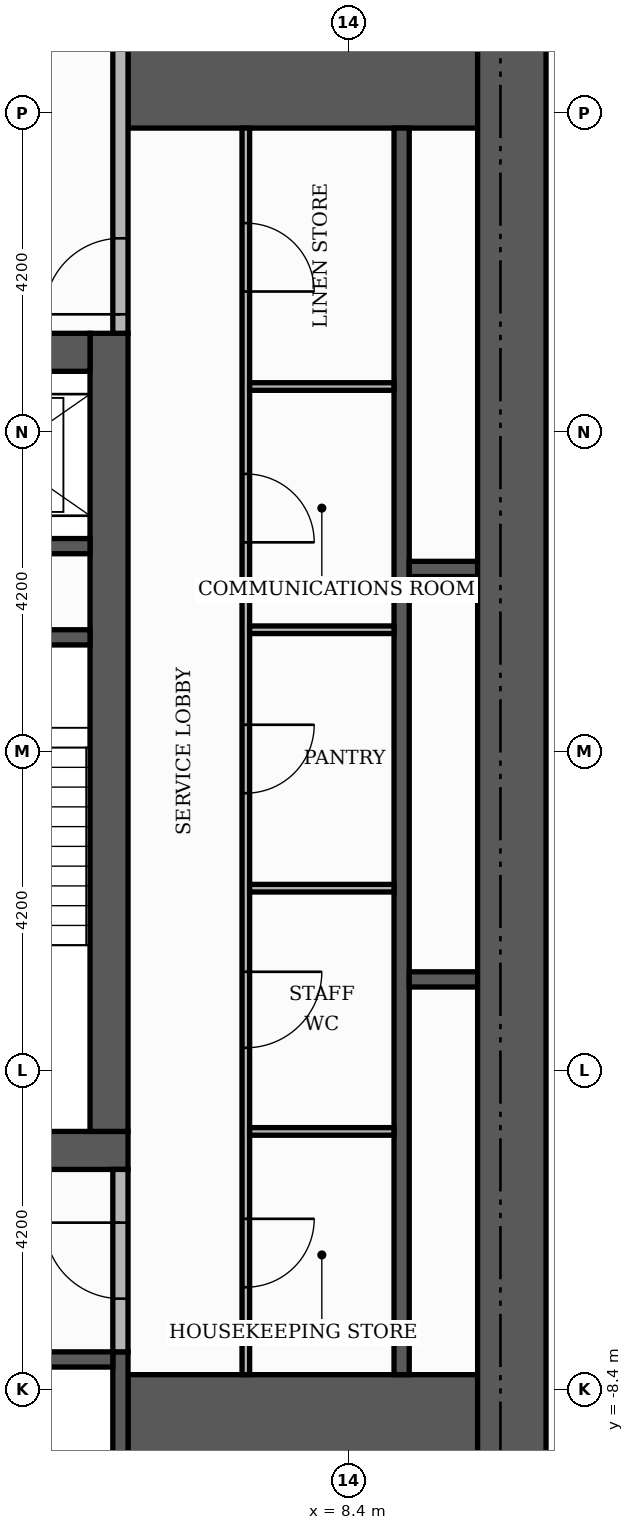
"""IFC4 building model, lengths in metres.
Left out: names, types, materials, properties, quantities, classifications, styles, units other than length and angle.
Written with IfcOpenShell. Run it as: python <this file> out.ifc"""

import sys

from ifc_helpers import new_model, si_unit, direction, frame, frame_2d, origin, place, context, subcontext, project, spatial, rectangle, extrude, element, fill, save


model = new_model("IFC4")
c1 = context("Model", 3, precision=1e-05, world=origin(), true_north=direction((0.0, 1.0)))
c2 = subcontext(c1, "Body", "Model", "MODEL_VIEW")
j1 = project(units=[si_unit("LENGTHUNIT", "METRE"), si_unit("PLANEANGLEUNIT", "RADIAN")], contexts=[c1])
p1 = place(None, origin())
s1 = spatial("IfcSite", under=j1, at=p1, CompositionType="ELEMENT")
p2 = place(p1, origin())
s2 = spatial("IfcBuilding", under=s1, at=p2, CompositionType="ELEMENT")
p3 = place(p2, frame((0.0, 0.0, 118.2)))
s3 = spatial("IfcBuildingStorey", under=s2, at=p3, CompositionType="ELEMENT", Elevation=118.2)
p4 = place(p3, frame((-5.5, -5.25, 0.0), z_axis=(0.0, 0.0, 1.0), x_axis=(1.0, 0.0, 0.0)))
e1 = element("IfcWall", 1, at=p4, inside=s3, PredefinedType="SHEAR", context=c2, shape_type="SweptSolid", body=[
    extrude(rectangle(XDim=11.0, YDim=0.5, at=frame_2d((5.5, 0.0))), origin(), (0.0, 0.0, 1.0), 3.48),
])
p5 = place(p4, frame((4.9, 0.0, 0.0)))
e2 = element("IfcOpeningElement", 2, at=p5, cuts=e1, PredefinedType="OPENING", context=c2, shape_type="SweptSolid", body=[
    extrude(rectangle(XDim=1.2, YDim=2.1, at=frame_2d((0.6, 1.05))), frame((0.0, 0.26, 0.0), z_axis=(0.0, -1.0, 0.0), x_axis=(1.0, 0.0, 0.0)), (0.0, 0.0, 1.0), 0.52),
])
p6 = place(p3, frame((5.25, -5.0, 0.0), z_axis=(0.0, 0.0, 1.0), x_axis=(0.0, 1.0, 0.0)))
e3 = element("IfcWall", 3, at=p6, inside=s3, PredefinedType="SHEAR", context=c2, shape_type="SweptSolid", body=[
    extrude(rectangle(XDim=10.5, YDim=0.5, at=frame_2d((5.25, 0.0))), origin(), (0.0, 0.0, 1.0), 3.48),
])
p7 = place(p3, frame((-5.0, 5.25, 0.0), z_axis=(0.0, 0.0, 1.0), x_axis=(1.0, 0.0, 0.0)))
e4 = element("IfcWall", 4, at=p7, inside=s3, PredefinedType="SHEAR", context=c2, shape_type="SweptSolid", body=[
    extrude(rectangle(XDim=10.0, YDim=0.5, at=frame_2d((5.0, 0.0))), origin(), (0.0, 0.0, 1.0), 3.48),
])
p8 = place(p7, frame((4.4, 0.0, 0.0)))
e5 = element("IfcOpeningElement", 5, at=p8, cuts=e4, PredefinedType="OPENING", context=c2, shape_type="SweptSolid", body=[
    extrude(rectangle(XDim=1.2, YDim=2.1, at=frame_2d((0.6, 1.05))), frame((0.0, 0.26, 0.0), z_axis=(0.0, -1.0, 0.0), x_axis=(1.0, 0.0, 0.0)), (0.0, 0.0, 1.0), 0.52),
])
for number, where, z_axis, x_axis in (
    (6, (5.5, -9.15, 0.0), (0.0, 0.0, 1.0), (1.0, 0.0, 0.0)),
    (7, (5.5, 9.15, 0.0), (0.0, 0.0, 1.0), (1.0, 0.0, 0.0)),
):
    element("IfcWall", number, at=place(p3, frame(where, z_axis=z_axis, x_axis=x_axis)), inside=s3, PredefinedType="SHEAR", context=c2, shape_type="SweptSolid", body=[
        extrude(rectangle(XDim=4.6, YDim=1.9, at=frame_2d((2.3, 0.0))), origin(), (0.0, 0.0, 1.0), 3.48),
    ])
p9 = place(p3, frame((2.15, 1.5, 0.0), z_axis=(0.0, 0.0, 1.0), x_axis=(1.0, 0.0, 0.0)))
e8 = element("IfcWall", 8, at=p9, inside=s3, PredefinedType="SHEAR", context=c2, shape_type="SweptSolid", body=[
    extrude(rectangle(XDim=2.85, YDim=0.2, at=frame_2d((1.425, 0.0))), origin(), (0.0, 0.0, 1.0), 3.48),
])
p10 = place(p3, frame((5.4, -10.1, 0.0), z_axis=(0.0, 0.0, 1.0), x_axis=(0.0, 1.0, 0.0)))
e9 = element("IfcWall", 9, at=p10, inside=s3, PredefinedType="SHEAR", context=c2, shape_type="SweptSolid", body=[
    extrude(rectangle(XDim=2.2, YDim=0.2, at=frame_2d((1.1, 0.0))), origin(), (0.0, 0.0, 1.0), 3.48),
])
p11 = place(p3, frame((9.1, -8.2, 0.0), z_axis=(0.0, 0.0, 1.0), x_axis=(0.0, 1.0, 0.0)))
e10 = element("IfcWall", 10, at=p11, inside=s3, PredefinedType="SHEAR", context=c2, shape_type="SweptSolid", body=[
    extrude(rectangle(XDim=16.4, YDim=0.2, at=frame_2d((8.2, 0.0))), origin(), (0.0, 0.0, 1.0), 3.48),
])
p12 = place(p3, frame((2.8, -8.0, 0.0), z_axis=(0.0, 0.0, 1.0), x_axis=(1.0, 0.0, 0.0)))
e11 = element("IfcWall", 11, at=p12, inside=s3, PredefinedType="SHEAR", context=c2, shape_type="SweptSolid", body=[
    extrude(rectangle(XDim=2.5, YDim=0.2, at=frame_2d((1.25, 0.0))), origin(), (0.0, 0.0, 1.0), 3.48),
])
for number, where, z_axis, x_axis in (
    (12, (9.2, -3.0, 0.0), (0.0, 0.0, 1.0), (1.0, 0.0, 0.0)),
    (13, (9.2, 2.4, 0.0), (0.0, 0.0, 1.0), (1.0, 0.0, 0.0)),
):
    element("IfcWall", number, at=place(p3, frame(where, z_axis=z_axis, x_axis=x_axis)), inside=s3, PredefinedType="SHEAR", context=c2, shape_type="SweptSolid", body=[
        extrude(rectangle(XDim=0.9, YDim=0.2, at=frame_2d((0.45, 0.0))), origin(), (0.0, 0.0, 1.0), 3.48),
    ])
p13 = place(p3, frame((2.15, 2.7, 0.0), z_axis=(0.0, 0.0, 1.0), x_axis=(1.0, 0.0, 0.0)))
e14 = element("IfcWall", 14, at=p13, inside=s3, PredefinedType="SHEAR", context=c2, shape_type="SweptSolid", body=[
    extrude(rectangle(XDim=2.85, YDim=0.2, at=frame_2d((1.425, 0.0))), origin(), (0.0, 0.0, 1.0), 3.48),
])
p14 = place(p3, frame((10.55, -10.1, 0.0), z_axis=(0.0, 0.0, 1.0), x_axis=(0.0, 1.0, 0.0)))
e15 = element("IfcWall", 15, at=p14, inside=s3, PredefinedType="SHEAR", context=c2, shape_type="SweptSolid", body=[
    extrude(rectangle(XDim=20.2, YDim=0.9, at=frame_2d((10.1, 0.0))), origin(), (0.0, 0.0, 1.0), 3.48),
])
p15 = place(p3, frame((7.05, -8.2, 0.0), z_axis=(0.0, 0.0, 1.0), x_axis=(0.0, 1.0, 0.0)))
e16 = element("IfcWall", 16, at=p15, inside=s3, PredefinedType="PARTITIONING", context=c2, shape_type="SweptSolid", body=[
    extrude(rectangle(XDim=16.4, YDim=0.1, at=frame_2d((8.2, 0.0))), origin(), (0.0, 0.0, 1.0), 3.48),
])
p16 = place(p15, frame((1.15, 0.0, 0.0)))
e17 = element("IfcOpeningElement", 17, at=p16, cuts=e16, PredefinedType="OPENING", context=c2, shape_type="SweptSolid", body=[
    extrude(rectangle(XDim=0.9, YDim=2.1, at=frame_2d((0.45, 1.05))), frame((0.0, 0.06, 0.0), z_axis=(0.0, -1.0, 0.0), x_axis=(1.0, 0.0, 0.0)), (0.0, 0.0, 1.0), 0.12),
])
p17 = place(p15, frame((4.3, 0.0, 0.0)))
e18 = element("IfcOpeningElement", 18, at=p17, cuts=e16, PredefinedType="OPENING", context=c2, shape_type="SweptSolid", body=[
    extrude(rectangle(XDim=1.0, YDim=2.1, at=frame_2d((0.5, 1.05))), frame((0.0, 0.06, 0.0), z_axis=(0.0, -1.0, 0.0), x_axis=(1.0, 0.0, 0.0)), (0.0, 0.0, 1.0), 0.12),
])
p18 = place(p15, frame((7.65, 0.0, 0.0)))
e19 = element("IfcOpeningElement", 19, at=p18, cuts=e16, PredefinedType="OPENING", context=c2, shape_type="SweptSolid", body=[
    extrude(rectangle(XDim=0.9, YDim=2.1, at=frame_2d((0.45, 1.05))), frame((0.0, 0.06, 0.0), z_axis=(0.0, -1.0, 0.0), x_axis=(1.0, 0.0, 0.0)), (0.0, 0.0, 1.0), 0.12),
])
p19 = place(p15, frame((10.95, 0.0, 0.0)))
e20 = element("IfcOpeningElement", 20, at=p19, cuts=e16, PredefinedType="OPENING", context=c2, shape_type="SweptSolid", body=[
    extrude(rectangle(XDim=0.9, YDim=2.1, at=frame_2d((0.45, 1.05))), frame((0.0, 0.06, 0.0), z_axis=(0.0, -1.0, 0.0), x_axis=(1.0, 0.0, 0.0)), (0.0, 0.0, 1.0), 0.12),
])
p20 = place(p15, frame((14.25, 0.0, 0.0)))
e21 = element("IfcOpeningElement", 21, at=p20, cuts=e16, PredefinedType="OPENING", context=c2, shape_type="SweptSolid", body=[
    extrude(rectangle(XDim=0.9, YDim=2.1, at=frame_2d((0.45, 1.05))), frame((0.0, 0.06, 0.0), z_axis=(0.0, -1.0, 0.0), x_axis=(1.0, 0.0, 0.0)), (0.0, 0.0, 1.0), 0.12),
])
p21 = place(p3, frame((5.4, -7.9, 0.0), z_axis=(0.0, 0.0, 1.0), x_axis=(0.0, 1.0, 0.0)))
e22 = element("IfcWall", 22, at=p21, inside=s3, PredefinedType="PARTITIONING", context=c2, shape_type="SweptSolid", body=[
    extrude(rectangle(XDim=2.4, YDim=0.2, at=frame_2d((1.2, 0.0))), origin(), (0.0, 0.0, 1.0), 3.48),
])
p22 = place(p21, frame((0.7, 0.0, 0.0)))
e23 = element("IfcOpeningElement", 23, at=p22, cuts=e22, PredefinedType="OPENING", context=c2, shape_type="SweptSolid", body=[
    extrude(rectangle(XDim=1.0, YDim=2.1, at=frame_2d((0.5, 1.05))), frame((0.0, 0.11, 0.0), z_axis=(0.0, -1.0, 0.0), x_axis=(1.0, 0.0, 0.0)), (0.0, 0.0, 1.0), 0.22),
])
for number, where, z_axis, x_axis in (
    (24, (7.1, -5.0, 0.0), (0.0, 0.0, 1.0), (1.0, 0.0, 0.0)),
    (25, (7.1, -1.8, 0.0), (0.0, 0.0, 1.0), (1.0, 0.0, 0.0)),
    (26, (7.1, 1.6, 0.0), (0.0, 0.0, 1.0), (1.0, 0.0, 0.0)),
    (27, (7.1, 4.8, 0.0), (0.0, 0.0, 1.0), (1.0, 0.0, 0.0)),
):
    element("IfcWall", number, at=place(p3, frame(where, z_axis=z_axis, x_axis=x_axis)), inside=s3, PredefinedType="PARTITIONING", context=c2, shape_type="SweptSolid", body=[
        extrude(rectangle(XDim=1.9, YDim=0.1, at=frame_2d((0.95, 0.0))), origin(), (0.0, 0.0, 1.0), 3.48),
    ])
p23 = place(p3, frame((5.4, 5.5, 0.0), z_axis=(0.0, 0.0, 1.0), x_axis=(0.0, 1.0, 0.0)))
e28 = element("IfcWall", 28, at=p23, inside=s3, PredefinedType="PARTITIONING", context=c2, shape_type="SweptSolid", body=[
    extrude(rectangle(XDim=4.6, YDim=0.2, at=frame_2d((2.3, 0.0))), origin(), (0.0, 0.0, 1.0), 3.48),
])
p24 = place(p23, frame((0.25, 0.0, 0.0)))
e29 = element("IfcOpeningElement", 29, at=p24, cuts=e28, PredefinedType="OPENING", context=c2, shape_type="SweptSolid", body=[
    extrude(rectangle(XDim=1.0, YDim=2.1, at=frame_2d((0.5, 1.05))), frame((0.0, 0.11, 0.0), z_axis=(0.0, -1.0, 0.0), x_axis=(1.0, 0.0, 0.0)), (0.0, 0.0, 1.0), 0.22),
])
p25 = place(p24, origin())
e30 = element("IfcDoor", 30, at=p25, inside=s3, OperationType="SINGLE_SWING_LEFT", PredefinedType="DOOR", context=c2, shape_type="SweptSolid", body=[
    extrude(rectangle(XDim=1.0, YDim=2.1, at=frame_2d((0.5, 1.05))), frame((0.0, 0.025, 0.0), z_axis=(0.0, -1.0, 0.0), x_axis=(1.0, 0.0, 0.0)), (0.0, 0.0, 1.0), 0.05),
])
fill(e29, e30)
p26 = place(p22, origin())
e31 = element("IfcDoor", 31, at=p26, inside=s3, OperationType="SINGLE_SWING_RIGHT", PredefinedType="DOOR", context=c2, shape_type="SweptSolid", body=[
    extrude(rectangle(XDim=1.0, YDim=2.1, at=frame_2d((0.5, 1.05))), frame((0.0, 0.025, 0.0), z_axis=(0.0, -1.0, 0.0), x_axis=(1.0, 0.0, 0.0)), (0.0, 0.0, 1.0), 0.05),
])
fill(e23, e31)
p27 = place(p16, frame((0.9, 0.0, 0.0), z_axis=(0.0, 0.0, 1.0), x_axis=(-1.0, 0.0, 0.0)))
e32 = element("IfcDoor", 32, at=p27, inside=s3, OperationType="SINGLE_SWING_RIGHT", PredefinedType="DOOR", context=c2, shape_type="SweptSolid", body=[
    extrude(rectangle(XDim=0.9, YDim=2.1, at=frame_2d((0.45, 1.05))), frame((0.0, 0.025, 0.0), z_axis=(0.0, -1.0, 0.0), x_axis=(1.0, 0.0, 0.0)), (0.0, 0.0, 1.0), 0.05),
])
fill(e17, e32)
p28 = place(p17, frame((1.0, 0.0, 0.0), z_axis=(0.0, 0.0, 1.0), x_axis=(-1.0, 0.0, 0.0)))
e33 = element("IfcDoor", 33, at=p28, inside=s3, OperationType="SINGLE_SWING_RIGHT", PredefinedType="DOOR", context=c2, shape_type="SweptSolid", body=[
    extrude(rectangle(XDim=1.0, YDim=2.1, at=frame_2d((0.5, 1.05))), frame((0.0, 0.025, 0.0), z_axis=(0.0, -1.0, 0.0), x_axis=(1.0, 0.0, 0.0)), (0.0, 0.0, 1.0), 0.05),
])
fill(e18, e33)
p29 = place(p18, frame((0.9, 0.0, 0.0), z_axis=(0.0, 0.0, 1.0), x_axis=(-1.0, 0.0, 0.0)))
e34 = element("IfcDoor", 34, at=p29, inside=s3, OperationType="SINGLE_SWING_RIGHT", PredefinedType="DOOR", context=c2, shape_type="SweptSolid", body=[
    extrude(rectangle(XDim=0.9, YDim=2.1, at=frame_2d((0.45, 1.05))), frame((0.0, 0.025, 0.0), z_axis=(0.0, -1.0, 0.0), x_axis=(1.0, 0.0, 0.0)), (0.0, 0.0, 1.0), 0.05),
])
fill(e19, e34)
p30 = place(p19, frame((0.9, 0.0, 0.0), z_axis=(0.0, 0.0, 1.0), x_axis=(-1.0, 0.0, 0.0)))
e35 = element("IfcDoor", 35, at=p30, inside=s3, OperationType="SINGLE_SWING_LEFT", PredefinedType="DOOR", context=c2, shape_type="SweptSolid", body=[
    extrude(rectangle(XDim=0.9, YDim=2.1, at=frame_2d((0.45, 1.05))), frame((0.0, 0.025, 0.0), z_axis=(0.0, -1.0, 0.0), x_axis=(1.0, 0.0, 0.0)), (0.0, 0.0, 1.0), 0.05),
])
fill(e20, e35)
p31 = place(p20, frame((0.9, 0.0, 0.0), z_axis=(0.0, 0.0, 1.0), x_axis=(-1.0, 0.0, 0.0)))
e36 = element("IfcDoor", 36, at=p31, inside=s3, OperationType="SINGLE_SWING_LEFT", PredefinedType="DOOR", context=c2, shape_type="SweptSolid", body=[
    extrude(rectangle(XDim=0.9, YDim=2.1, at=frame_2d((0.45, 1.05))), frame((0.0, 0.025, 0.0), z_axis=(0.0, -1.0, 0.0), x_axis=(1.0, 0.0, 0.0)), (0.0, 0.0, 1.0), 0.05),
])
fill(e21, e36)
save(model, sys.argv[1])
